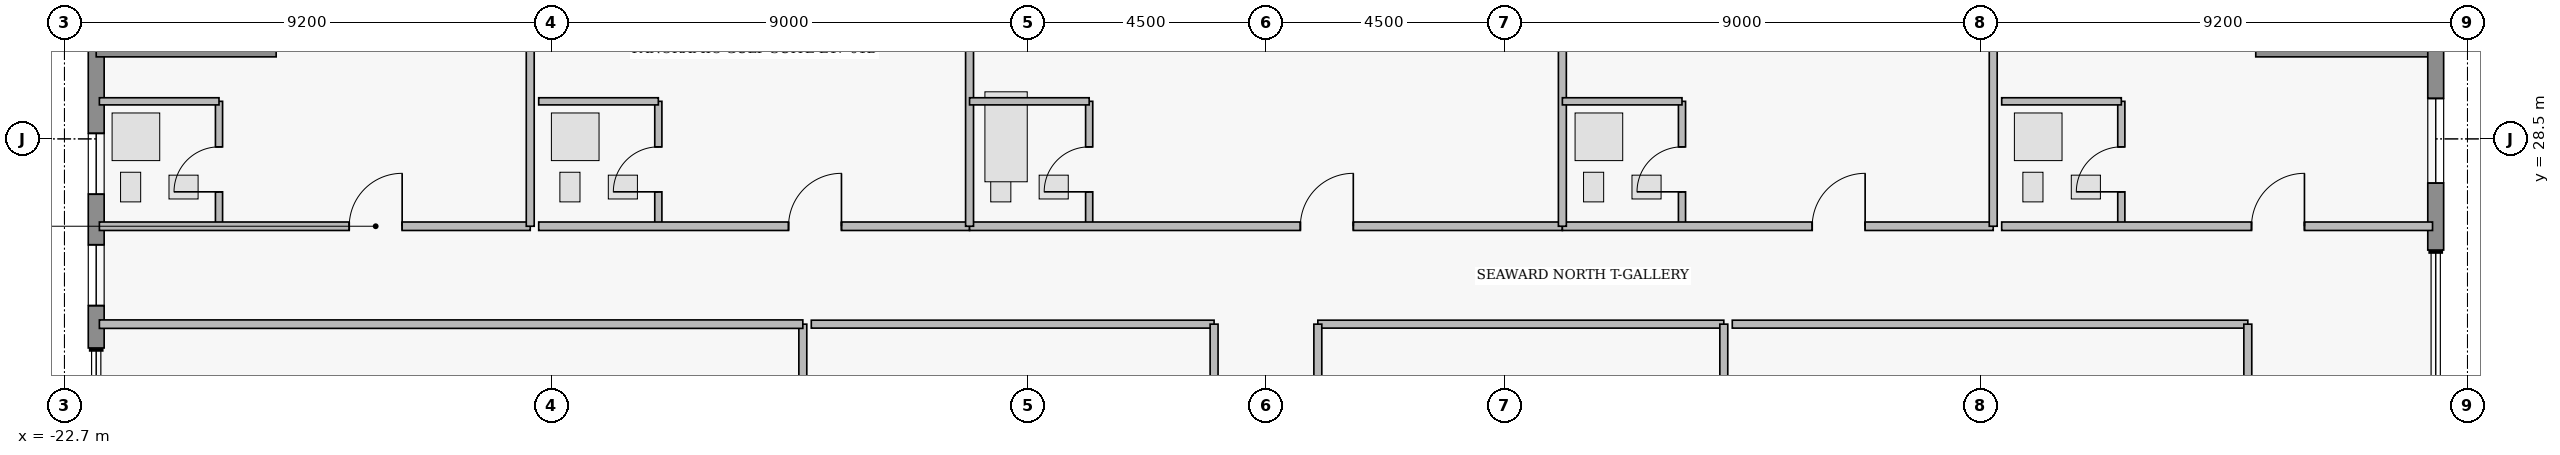
"""IFC4 building model, lengths in metres.
Left out: names, types, materials, properties, quantities, classifications, styles, units other than length and angle.
Written with IfcOpenShell. Run it as: python <this file> out.ifc"""

import sys

from ifc_helpers import new_model, si_unit, direction, frame, frame_2d, origin, place, context, subcontext, project, spatial, rectangle, extrude, element, fill, save


model = new_model("IFC4")
c1 = context("Model", 3, precision=1e-05, world=origin(), true_north=direction((0.0, 1.0)))
c2 = subcontext(c1, "Body", "Model", "MODEL_VIEW")
j1 = project(units=[si_unit("LENGTHUNIT", "METRE"), si_unit("PLANEANGLEUNIT", "RADIAN")], contexts=[c1])
p1 = place(None, origin())
s1 = spatial("IfcSite", under=j1, at=p1, CompositionType="ELEMENT")
p2 = place(p1, origin())
s2 = spatial("IfcBuilding", under=s1, at=p2, CompositionType="ELEMENT")
p3 = place(p2, frame((0.0, 0.0, 188.65)))
s3 = spatial("IfcBuildingStorey", under=s2, at=p3, CompositionType="ELEMENT", Elevation=188.65)
p4 = place(p3, frame((-22.1, 24.55, 0.0), z_axis=(0.0, 0.0, 1.0), x_axis=(0.0, 1.0, 0.0)))
e1 = element("IfcWall", 1, at=p4, inside=s3, PredefinedType="STANDARD", context=c2, shape_type="SweptSolid", body=[
    extrude(rectangle(XDim=5.65, YDim=0.3, at=frame_2d((2.825, 0.0))), origin(), (0.0, 0.0, 1.0), 3.53),
])
p5 = place(p4, frame((0.8, 0.0, 0.95)))
e2 = element("IfcOpeningElement", 2, at=p5, cuts=e1, PredefinedType="OPENING", context=c2, shape_type="SweptSolid", body=[
    extrude(rectangle(XDim=1.15, YDim=1.55, at=frame_2d((0.575, 0.775))), frame((0.0, 0.16, 0.0), z_axis=(0.0, -1.0, 0.0), x_axis=(1.0, 0.0, 0.0)), (0.0, 0.0, 1.0), 0.32),
])
p6 = place(p4, frame((2.905, 0.0, 0.95)))
e3 = element("IfcOpeningElement", 3, at=p6, cuts=e1, PredefinedType="OPENING", context=c2, shape_type="SweptSolid", body=[
    extrude(rectangle(XDim=1.15, YDim=1.55, at=frame_2d((0.575, 0.775))), frame((0.0, 0.16, 0.0), z_axis=(0.0, -1.0, 0.0), x_axis=(1.0, 0.0, 0.0)), (0.0, 0.0, 1.0), 0.32),
])
for number, where, z_axis, x_axis in (
    (4, (-22.1, 30.2, 0.0), (0.0, 0.0, 1.0), (1.0, 0.0, 0.0)),
    (5, (18.7, 30.2, 0.0), (0.0, 0.0, 1.0), (1.0, 0.0, 0.0)),
):
    element("IfcWall", number, at=place(p3, frame(where, z_axis=z_axis, x_axis=x_axis)), inside=s3, PredefinedType="STANDARD", context=c2, shape_type="SweptSolid", body=[
        extrude(rectangle(XDim=3.4, YDim=0.3, at=frame_2d((1.7, 0.0))), origin(), (0.0, 0.0, 1.0), 3.53),
    ])
p7 = place(p3, frame((22.1, 30.2, 0.0), z_axis=(0.0, 0.0, 1.0), x_axis=(0.0, -1.0, 0.0)))
e6 = element("IfcWall", 6, at=p7, inside=s3, PredefinedType="STANDARD", context=c2, shape_type="SweptSolid", body=[
    extrude(rectangle(XDim=3.8, YDim=0.3, at=frame_2d((1.9, 0.0))), origin(), (0.0, 0.0, 1.0), 3.53),
])
p8 = place(p7, frame((0.935, 0.0, 0.85)))
e7 = element("IfcOpeningElement", 7, at=p8, cuts=e6, PredefinedType="OPENING", context=c2, shape_type="SweptSolid", body=[
    extrude(rectangle(XDim=1.6, YDim=1.8, at=frame_2d((0.8, 0.9))), frame((0.0, 0.16, 0.0), z_axis=(0.0, -1.0, 0.0), x_axis=(1.0, 0.0, 0.0)), (0.0, 0.0, 1.0), 0.32),
])
p9 = place(p3, frame((-19.78, 26.85, 0.0), z_axis=(0.0, 0.0, 1.0), x_axis=(0.0, 1.0, 0.0)))
e8 = element("IfcWall", 8, at=p9, inside=s3, PredefinedType="PLUMBINGWALL", context=c2, shape_type="SweptSolid", body=[
    extrude(rectangle(XDim=2.36, YDim=0.135, at=frame_2d((1.18, 0.0))), origin(), (0.0, 0.0, 1.0), 3.53),
])
p10 = place(p9, frame((0.65, 0.0, 0.0)))
e9 = element("IfcOpeningElement", 9, at=p10, cuts=e8, PredefinedType="OPENING", context=c2, shape_type="SweptSolid", body=[
    extrude(rectangle(XDim=0.85, YDim=2.1, at=frame_2d((0.425, 1.05))), frame((0.0, 0.077, 0.0), z_axis=(0.0, -1.0, 0.0), x_axis=(1.0, 0.0, 0.0)), (0.0, 0.0, 1.0), 0.155),
])
p11 = place(p3, frame((-22.04, 26.85, 0.0), z_axis=(0.0, 0.0, 1.0), x_axis=(1.0, 0.0, 0.0)))
e10 = element("IfcWall", 10, at=p11, inside=s3, PredefinedType="PARTITIONING", context=c2, shape_type="SweptSolid", body=[
    extrude(rectangle(XDim=8.14, YDim=0.16, at=frame_2d((4.07, 0.0))), origin(), (0.0, 0.0, 1.0), 3.53),
])
p12 = place(p11, frame((4.72, 0.0, 0.0)))
e11 = element("IfcOpeningElement", 11, at=p12, cuts=e10, PredefinedType="OPENING", context=c2, shape_type="SweptSolid", body=[
    extrude(rectangle(XDim=1.0, YDim=2.15, at=frame_2d((0.5, 1.075))), frame((0.0, 0.09, 0.0), z_axis=(0.0, -1.0, 0.0), x_axis=(1.0, 0.0, 0.0)), (0.0, 0.0, 1.0), 0.18),
])
p13 = place(p3, frame((-11.48, 26.85, 0.0), z_axis=(0.0, 0.0, 1.0), x_axis=(0.0, 1.0, 0.0)))
e12 = element("IfcWall", 12, at=p13, inside=s3, PredefinedType="PLUMBINGWALL", context=c2, shape_type="SweptSolid", body=[
    extrude(rectangle(XDim=2.36, YDim=0.135, at=frame_2d((1.18, 0.0))), origin(), (0.0, 0.0, 1.0), 3.53),
])
p14 = place(p13, frame((0.65, 0.0, 0.0)))
e13 = element("IfcOpeningElement", 13, at=p14, cuts=e12, PredefinedType="OPENING", context=c2, shape_type="SweptSolid", body=[
    extrude(rectangle(XDim=0.85, YDim=2.1, at=frame_2d((0.425, 1.05))), frame((0.0, 0.077, 0.0), z_axis=(0.0, -1.0, 0.0), x_axis=(1.0, 0.0, 0.0)), (0.0, 0.0, 1.0), 0.155),
])
p15 = place(p3, frame((-13.74, 26.85, 0.0), z_axis=(0.0, 0.0, 1.0), x_axis=(1.0, 0.0, 0.0)))
e14 = element("IfcWall", 14, at=p15, inside=s3, PredefinedType="PARTITIONING", context=c2, shape_type="SweptSolid", body=[
    extrude(rectangle(XDim=8.14, YDim=0.16, at=frame_2d((4.07, 0.0))), origin(), (0.0, 0.0, 1.0), 3.53),
])
p16 = place(p15, frame((4.72, 0.0, 0.0)))
e15 = element("IfcOpeningElement", 15, at=p16, cuts=e14, PredefinedType="OPENING", context=c2, shape_type="SweptSolid", body=[
    extrude(rectangle(XDim=1.0, YDim=2.15, at=frame_2d((0.5, 1.075))), frame((0.0, 0.09, 0.0), z_axis=(0.0, -1.0, 0.0), x_axis=(1.0, 0.0, 0.0)), (0.0, 0.0, 1.0), 0.18),
])
p17 = place(p3, frame((-3.34, 26.85, 0.0), z_axis=(0.0, 0.0, 1.0), x_axis=(0.0, 1.0, 0.0)))
e16 = element("IfcWall", 16, at=p17, inside=s3, PredefinedType="PLUMBINGWALL", context=c2, shape_type="SweptSolid", body=[
    extrude(rectangle(XDim=2.36, YDim=0.135, at=frame_2d((1.18, 0.0))), origin(), (0.0, 0.0, 1.0), 3.53),
])
p18 = place(p17, frame((0.65, 0.0, 0.0)))
e17 = element("IfcOpeningElement", 17, at=p18, cuts=e16, PredefinedType="OPENING", context=c2, shape_type="SweptSolid", body=[
    extrude(rectangle(XDim=0.85, YDim=2.1, at=frame_2d((0.425, 1.05))), frame((0.0, 0.077, 0.0), z_axis=(0.0, -1.0, 0.0), x_axis=(1.0, 0.0, 0.0)), (0.0, 0.0, 1.0), 0.155),
])
p19 = place(p3, frame((-5.6, 26.85, 0.0), z_axis=(0.0, 0.0, 1.0), x_axis=(1.0, 0.0, 0.0)))
e18 = element("IfcWall", 18, at=p19, inside=s3, PredefinedType="PARTITIONING", context=c2, shape_type="SweptSolid", body=[
    extrude(rectangle(XDim=11.2, YDim=0.16, at=frame_2d((5.6, 0.0))), origin(), (0.0, 0.0, 1.0), 3.53),
])
p20 = place(p19, frame((6.25, 0.0, 0.0)))
e19 = element("IfcOpeningElement", 19, at=p20, cuts=e18, PredefinedType="OPENING", context=c2, shape_type="SweptSolid", body=[
    extrude(rectangle(XDim=1.0, YDim=2.15, at=frame_2d((0.5, 1.075))), frame((0.0, 0.09, 0.0), z_axis=(0.0, -1.0, 0.0), x_axis=(1.0, 0.0, 0.0)), (0.0, 0.0, 1.0), 0.18),
])
p21 = place(p3, frame((7.86, 26.85, 0.0), z_axis=(0.0, 0.0, 1.0), x_axis=(0.0, 1.0, 0.0)))
e20 = element("IfcWall", 20, at=p21, inside=s3, PredefinedType="PLUMBINGWALL", context=c2, shape_type="SweptSolid", body=[
    extrude(rectangle(XDim=2.36, YDim=0.135, at=frame_2d((1.18, 0.0))), origin(), (0.0, 0.0, 1.0), 3.53),
])
p22 = place(p21, frame((0.65, 0.0, 0.0)))
e21 = element("IfcOpeningElement", 21, at=p22, cuts=e20, PredefinedType="OPENING", context=c2, shape_type="SweptSolid", body=[
    extrude(rectangle(XDim=0.85, YDim=2.1, at=frame_2d((0.425, 1.05))), frame((0.0, 0.077, 0.0), z_axis=(0.0, -1.0, 0.0), x_axis=(1.0, 0.0, 0.0)), (0.0, 0.0, 1.0), 0.155),
])
p23 = place(p3, frame((5.6, 26.85, 0.0), z_axis=(0.0, 0.0, 1.0), x_axis=(1.0, 0.0, 0.0)))
e22 = element("IfcWall", 22, at=p23, inside=s3, PredefinedType="PARTITIONING", context=c2, shape_type="SweptSolid", body=[
    extrude(rectangle(XDim=8.14, YDim=0.16, at=frame_2d((4.07, 0.0))), origin(), (0.0, 0.0, 1.0), 3.53),
])
p24 = place(p23, frame((4.72, 0.0, 0.0)))
e23 = element("IfcOpeningElement", 23, at=p24, cuts=e22, PredefinedType="OPENING", context=c2, shape_type="SweptSolid", body=[
    extrude(rectangle(XDim=1.0, YDim=2.15, at=frame_2d((0.5, 1.075))), frame((0.0, 0.09, 0.0), z_axis=(0.0, -1.0, 0.0), x_axis=(1.0, 0.0, 0.0)), (0.0, 0.0, 1.0), 0.18),
])
p25 = place(p3, frame((16.16, 26.85, 0.0), z_axis=(0.0, 0.0, 1.0), x_axis=(0.0, 1.0, 0.0)))
e24 = element("IfcWall", 24, at=p25, inside=s3, PredefinedType="PLUMBINGWALL", context=c2, shape_type="SweptSolid", body=[
    extrude(rectangle(XDim=2.36, YDim=0.135, at=frame_2d((1.18, 0.0))), origin(), (0.0, 0.0, 1.0), 3.53),
])
p26 = place(p25, frame((0.65, 0.0, 0.0)))
e25 = element("IfcOpeningElement", 25, at=p26, cuts=e24, PredefinedType="OPENING", context=c2, shape_type="SweptSolid", body=[
    extrude(rectangle(XDim=0.85, YDim=2.1, at=frame_2d((0.425, 1.05))), frame((0.0, 0.077, 0.0), z_axis=(0.0, -1.0, 0.0), x_axis=(1.0, 0.0, 0.0)), (0.0, 0.0, 1.0), 0.155),
])
p27 = place(p3, frame((13.9, 26.85, 0.0), z_axis=(0.0, 0.0, 1.0), x_axis=(1.0, 0.0, 0.0)))
e26 = element("IfcWall", 26, at=p27, inside=s3, PredefinedType="PARTITIONING", context=c2, shape_type="SweptSolid", body=[
    extrude(rectangle(XDim=8.14, YDim=0.16, at=frame_2d((4.07, 0.0))), origin(), (0.0, 0.0, 1.0), 3.53),
])
p28 = place(p27, frame((4.72, 0.0, 0.0)))
e27 = element("IfcOpeningElement", 27, at=p28, cuts=e26, PredefinedType="OPENING", context=c2, shape_type="SweptSolid", body=[
    extrude(rectangle(XDim=1.0, YDim=2.15, at=frame_2d((0.5, 1.075))), frame((0.0, 0.09, 0.0), z_axis=(0.0, -1.0, 0.0), x_axis=(1.0, 0.0, 0.0)), (0.0, 0.0, 1.0), 0.18),
])
p29 = place(p3, frame((-22.04, 29.21, 0.0), z_axis=(0.0, 0.0, 1.0), x_axis=(1.0, 0.0, 0.0)))
e28 = element("IfcWall", 28, at=p29, inside=s3, PredefinedType="PLUMBINGWALL", context=c2, shape_type="SweptSolid", body=[
    extrude(rectangle(XDim=2.26, YDim=0.135, at=frame_2d((1.13, 0.0))), origin(), (0.0, 0.0, 1.0), 3.53),
])
p30 = place(p3, frame((-13.9, 26.85, 0.0), z_axis=(0.0, 0.0, 1.0), x_axis=(0.0, 1.0, 0.0)))
e29 = element("IfcWall", 29, at=p30, inside=s3, PredefinedType="PARTITIONING", context=c2, shape_type="SweptSolid", body=[
    extrude(rectangle(XDim=6.67, YDim=0.15, at=frame_2d((3.335, 0.0))), origin(), (0.0, 0.0, 1.0), 2.519),
])
p31 = place(p3, frame((-13.74, 29.21, 0.0), z_axis=(0.0, 0.0, 1.0), x_axis=(1.0, 0.0, 0.0)))
e30 = element("IfcWall", 30, at=p31, inside=s3, PredefinedType="PLUMBINGWALL", context=c2, shape_type="SweptSolid", body=[
    extrude(rectangle(XDim=2.26, YDim=0.135, at=frame_2d((1.13, 0.0))), origin(), (0.0, 0.0, 1.0), 3.53),
])
p32 = place(p3, frame((-5.6, 26.85, 0.0), z_axis=(0.0, 0.0, 1.0), x_axis=(0.0, 1.0, 0.0)))
e31 = element("IfcWall", 31, at=p32, inside=s3, PredefinedType="PARTITIONING", context=c2, shape_type="SweptSolid", body=[
    extrude(rectangle(XDim=6.67, YDim=0.15, at=frame_2d((3.335, 0.0))), origin(), (0.0, 0.0, 1.0), 3.53),
])
p33 = place(p3, frame((-5.6, 29.21, 0.0), z_axis=(0.0, 0.0, 1.0), x_axis=(1.0, 0.0, 0.0)))
e32 = element("IfcWall", 32, at=p33, inside=s3, PredefinedType="PLUMBINGWALL", context=c2, shape_type="SweptSolid", body=[
    extrude(rectangle(XDim=2.26, YDim=0.135, at=frame_2d((1.13, 0.0))), origin(), (0.0, 0.0, 1.0), 3.53),
])
p34 = place(p3, frame((5.6, 26.85, 0.0), z_axis=(0.0, 0.0, 1.0), x_axis=(0.0, 1.0, 0.0)))
e33 = element("IfcWall", 33, at=p34, inside=s3, PredefinedType="PARTITIONING", context=c2, shape_type="SweptSolid", body=[
    extrude(rectangle(XDim=6.67, YDim=0.15, at=frame_2d((3.335, 0.0))), origin(), (0.0, 0.0, 1.0), 3.53),
])
p35 = place(p3, frame((5.6, 29.21, 0.0), z_axis=(0.0, 0.0, 1.0), x_axis=(1.0, 0.0, 0.0)))
e34 = element("IfcWall", 34, at=p35, inside=s3, PredefinedType="PLUMBINGWALL", context=c2, shape_type="SweptSolid", body=[
    extrude(rectangle(XDim=2.26, YDim=0.135, at=frame_2d((1.13, 0.0))), origin(), (0.0, 0.0, 1.0), 3.53),
])
p36 = place(p3, frame((13.74, 26.85, 0.0), z_axis=(0.0, 0.0, 1.0), x_axis=(0.0, 1.0, 0.0)))
e35 = element("IfcWall", 35, at=p36, inside=s3, PredefinedType="PARTITIONING", context=c2, shape_type="SweptSolid", body=[
    extrude(rectangle(XDim=6.67, YDim=0.15, at=frame_2d((3.335, 0.0))), origin(), (0.0, 0.0, 1.0), 2.519),
])
p37 = place(p3, frame((13.9, 29.21, 0.0), z_axis=(0.0, 0.0, 1.0), x_axis=(1.0, 0.0, 0.0)))
e36 = element("IfcWall", 36, at=p37, inside=s3, PredefinedType="PLUMBINGWALL", context=c2, shape_type="SweptSolid", body=[
    extrude(rectangle(XDim=2.26, YDim=0.135, at=frame_2d((1.13, 0.0))), origin(), (0.0, 0.0, 1.0), 3.53),
])
p38 = place(p3, frame((-8.75, 16.7, 0.0), z_axis=(0.0, 0.0, 1.0), x_axis=(0.0, 1.0, 0.0)))
e37 = element("IfcWall", 37, at=p38, inside=s3, PredefinedType="PARTITIONING", context=c2, shape_type="SweptSolid", body=[
    extrude(rectangle(XDim=8.3, YDim=0.15, at=frame_2d((4.15, 0.0))), origin(), (0.0, 0.0, 1.0), 3.53),
])
p39 = place(p3, frame((-22.04, 25.0, 0.0), z_axis=(0.0, 0.0, 1.0), x_axis=(1.0, 0.0, 0.0)))
e38 = element("IfcWall", 38, at=p39, inside=s3, PredefinedType="PARTITIONING", context=c2, shape_type="SweptSolid", body=[
    extrude(rectangle(XDim=13.29, YDim=0.16, at=frame_2d((6.645, 0.0))), origin(), (0.0, 0.0, 1.0), 3.124),
])
p40 = place(p3, frame((-8.59, 25.0, 0.0), z_axis=(0.0, 0.0, 1.0), x_axis=(1.0, 0.0, 0.0)))
e39 = element("IfcWall", 39, at=p40, inside=s3, PredefinedType="PARTITIONING", context=c2, shape_type="SweptSolid", body=[
    extrude(rectangle(XDim=7.61, YDim=0.15, at=frame_2d((3.805, 0.0))), origin(), (0.0, 0.0, 1.0), 3.124),
])
p41 = place(p3, frame((-0.98, 16.7, 0.0), z_axis=(0.0, 0.0, 1.0), x_axis=(0.0, 1.0, 0.0)))
e40 = element("IfcWall", 40, at=p41, inside=s3, PredefinedType="PARTITIONING", context=c2, shape_type="SweptSolid", body=[
    extrude(rectangle(XDim=8.3, YDim=0.15, at=frame_2d((4.15, 0.0))), origin(), (0.0, 0.0, 1.0), 3.53),
])
p42 = place(p3, frame((0.98, 25.0, 0.0), z_axis=(0.0, 0.0, 1.0), x_axis=(1.0, 0.0, 0.0)))
e41 = element("IfcWall", 41, at=p42, inside=s3, PredefinedType="PARTITIONING", context=c2, shape_type="SweptSolid", body=[
    extrude(rectangle(XDim=7.67, YDim=0.15, at=frame_2d((3.835, 0.0))), origin(), (0.0, 0.0, 1.0), 3.124),
])
for number, where, z_axis, x_axis in (
    (42, (0.98, 16.7, 0.0), (0.0, 0.0, 1.0), (0.0, 1.0, 0.0)),
    (43, (8.65, 16.7, 0.0), (0.0, 0.0, 1.0), (0.0, 1.0, 0.0)),
):
    element("IfcWall", number, at=place(p3, frame(where, z_axis=z_axis, x_axis=x_axis)), inside=s3, PredefinedType="PARTITIONING", context=c2, shape_type="SweptSolid", body=[
        extrude(rectangle(XDim=8.3, YDim=0.15, at=frame_2d((4.15, 0.0))), origin(), (0.0, 0.0, 1.0), 3.53),
    ])
p43 = place(p3, frame((8.81, 25.0, 0.0), z_axis=(0.0, 0.0, 1.0), x_axis=(1.0, 0.0, 0.0)))
e44 = element("IfcWall", 44, at=p43, inside=s3, PredefinedType="PARTITIONING", context=c2, shape_type="SweptSolid", body=[
    extrude(rectangle(XDim=9.74, YDim=0.15, at=frame_2d((4.87, 0.0))), origin(), (0.0, 0.0, 1.0), 3.124),
])
p44 = place(p3, frame((18.55, 16.7, 0.0), z_axis=(0.0, 0.0, 1.0), x_axis=(0.0, 1.0, 0.0)))
e45 = element("IfcWall", 45, at=p44, inside=s3, PredefinedType="PARTITIONING", context=c2, shape_type="SweptSolid", body=[
    extrude(rectangle(XDim=8.3, YDim=0.15, at=frame_2d((4.15, 0.0))), origin(), (0.0, 0.0, 1.0), 3.53),
])
p45 = place(p5, origin())
e46 = element("IfcWindow", 46, at=p45, inside=s3, PartitioningType="SINGLE_PANEL", PredefinedType="WINDOW", context=c2, shape_type="SweptSolid", body=[
    extrude(rectangle(XDim=1.15, YDim=1.55, at=frame_2d((0.575, 0.775))), frame((0.0, 0.03, 0.0), z_axis=(0.0, -1.0, 0.0), x_axis=(1.0, 0.0, 0.0)), (0.0, 0.0, 1.0), 0.06),
])
fill(e2, e46)
p46 = place(p6, origin())
e47 = element("IfcWindow", 47, at=p46, inside=s3, PartitioningType="SINGLE_PANEL", PredefinedType="WINDOW", context=c2, shape_type="SweptSolid", body=[
    extrude(rectangle(XDim=1.15, YDim=1.55, at=frame_2d((0.575, 0.775))), frame((0.0, 0.03, 0.0), z_axis=(0.0, -1.0, 0.0), x_axis=(1.0, 0.0, 0.0)), (0.0, 0.0, 1.0), 0.06),
])
fill(e3, e47)
p47 = place(p8, origin())
e48 = element("IfcWindow", 48, at=p47, inside=s3, PartitioningType="SINGLE_PANEL", PredefinedType="WINDOW", context=c2, shape_type="SweptSolid", body=[
    extrude(rectangle(XDim=1.6, YDim=1.8, at=frame_2d((0.8, 0.9))), frame((0.0, 0.03, 0.0), z_axis=(0.0, -1.0, 0.0), x_axis=(1.0, 0.0, 0.0)), (0.0, 0.0, 1.0), 0.06),
])
fill(e7, e48)
p48 = place(p10, origin())
e49 = element("IfcDoor", 49, at=p48, inside=s3, OperationType="SINGLE_SWING_LEFT", PredefinedType="DOOR", context=c2, shape_type="SweptSolid", body=[
    extrude(rectangle(XDim=0.85, YDim=2.1, at=frame_2d((0.425, 1.05))), frame((0.0, 0.025, 0.0), z_axis=(0.0, -1.0, 0.0), x_axis=(1.0, 0.0, 0.0)), (0.0, 0.0, 1.0), 0.05),
])
fill(e9, e49)
p49 = place(p12, origin())
e50 = element("IfcDoor", 50, at=p49, inside=s3, OperationType="SINGLE_SWING_RIGHT", PredefinedType="DOOR", context=c2, shape_type="SweptSolid", body=[
    extrude(rectangle(XDim=1.0, YDim=2.15, at=frame_2d((0.5, 1.075))), frame((0.0, 0.025, 0.0), z_axis=(0.0, -1.0, 0.0), x_axis=(1.0, 0.0, 0.0)), (0.0, 0.0, 1.0), 0.05),
])
fill(e11, e50)
p50 = place(p14, origin())
e51 = element("IfcDoor", 51, at=p50, inside=s3, OperationType="SINGLE_SWING_LEFT", PredefinedType="DOOR", context=c2, shape_type="SweptSolid", body=[
    extrude(rectangle(XDim=0.85, YDim=2.1, at=frame_2d((0.425, 1.05))), frame((0.0, 0.025, 0.0), z_axis=(0.0, -1.0, 0.0), x_axis=(1.0, 0.0, 0.0)), (0.0, 0.0, 1.0), 0.05),
])
fill(e13, e51)
p51 = place(p16, origin())
e52 = element("IfcDoor", 52, at=p51, inside=s3, OperationType="SINGLE_SWING_RIGHT", PredefinedType="DOOR", context=c2, shape_type="SweptSolid", body=[
    extrude(rectangle(XDim=1.0, YDim=2.15, at=frame_2d((0.5, 1.075))), frame((0.0, 0.025, 0.0), z_axis=(0.0, -1.0, 0.0), x_axis=(1.0, 0.0, 0.0)), (0.0, 0.0, 1.0), 0.05),
])
fill(e15, e52)
p52 = place(p18, origin())
e53 = element("IfcDoor", 53, at=p52, inside=s3, OperationType="SINGLE_SWING_LEFT", PredefinedType="DOOR", context=c2, shape_type="SweptSolid", body=[
    extrude(rectangle(XDim=0.85, YDim=2.1, at=frame_2d((0.425, 1.05))), frame((0.0, 0.025, 0.0), z_axis=(0.0, -1.0, 0.0), x_axis=(1.0, 0.0, 0.0)), (0.0, 0.0, 1.0), 0.05),
])
fill(e17, e53)
p53 = place(p20, origin())
e54 = element("IfcDoor", 54, at=p53, inside=s3, OperationType="SINGLE_SWING_RIGHT", PredefinedType="DOOR", context=c2, shape_type="SweptSolid", body=[
    extrude(rectangle(XDim=1.0, YDim=2.15, at=frame_2d((0.5, 1.075))), frame((0.0, 0.025, 0.0), z_axis=(0.0, -1.0, 0.0), x_axis=(1.0, 0.0, 0.0)), (0.0, 0.0, 1.0), 0.05),
])
fill(e19, e54)
p54 = place(p22, origin())
e55 = element("IfcDoor", 55, at=p54, inside=s3, OperationType="SINGLE_SWING_LEFT", PredefinedType="DOOR", context=c2, shape_type="SweptSolid", body=[
    extrude(rectangle(XDim=0.85, YDim=2.1, at=frame_2d((0.425, 1.05))), frame((0.0, 0.025, 0.0), z_axis=(0.0, -1.0, 0.0), x_axis=(1.0, 0.0, 0.0)), (0.0, 0.0, 1.0), 0.05),
])
fill(e21, e55)
p55 = place(p24, origin())
e56 = element("IfcDoor", 56, at=p55, inside=s3, OperationType="SINGLE_SWING_RIGHT", PredefinedType="DOOR", context=c2, shape_type="SweptSolid", body=[
    extrude(rectangle(XDim=1.0, YDim=2.15, at=frame_2d((0.5, 1.075))), frame((0.0, 0.025, 0.0), z_axis=(0.0, -1.0, 0.0), x_axis=(1.0, 0.0, 0.0)), (0.0, 0.0, 1.0), 0.05),
])
fill(e23, e56)
p56 = place(p26, origin())
e57 = element("IfcDoor", 57, at=p56, inside=s3, OperationType="SINGLE_SWING_LEFT", PredefinedType="DOOR", context=c2, shape_type="SweptSolid", body=[
    extrude(rectangle(XDim=0.85, YDim=2.1, at=frame_2d((0.425, 1.05))), frame((0.0, 0.025, 0.0), z_axis=(0.0, -1.0, 0.0), x_axis=(1.0, 0.0, 0.0)), (0.0, 0.0, 1.0), 0.05),
])
fill(e25, e57)
p57 = place(p28, origin())
e58 = element("IfcDoor", 58, at=p57, inside=s3, OperationType="SINGLE_SWING_RIGHT", PredefinedType="DOOR", context=c2, shape_type="SweptSolid", body=[
    extrude(rectangle(XDim=1.0, YDim=2.15, at=frame_2d((0.5, 1.075))), frame((0.0, 0.025, 0.0), z_axis=(0.0, -1.0, 0.0), x_axis=(1.0, 0.0, 0.0)), (0.0, 0.0, 1.0), 0.05),
])
fill(e27, e58)
save(model, sys.argv[1])
